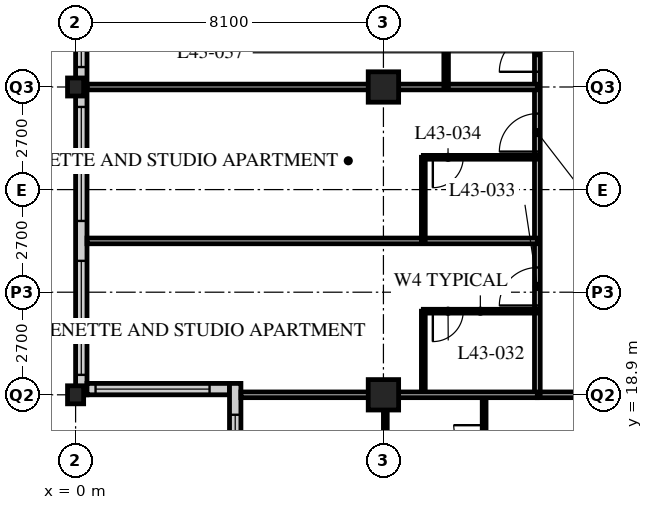
"""IFC4 building model, lengths in metres.
Left out: names, types, materials, properties, quantities, classifications, styles, units other than length and angle.
Written with IfcOpenShell. Run it as: python <this file> out.ifc"""

import sys

from ifc_helpers import new_model, si_unit, direction, frame, frame_2d, origin, origin_2d, place, context, subcontext, project, spatial, rectangle, hollow_rectangle, i_section, extrude, element, fill, save


model = new_model("IFC4")
c1 = context("Model", 3, precision=1e-05, world=origin(), true_north=direction((0.0, 1.0)))
c2 = subcontext(c1, "Body", "Model", "MODEL_VIEW")
j1 = project(units=[si_unit("LENGTHUNIT", "METRE"), si_unit("PLANEANGLEUNIT", "RADIAN")], contexts=[c1])
p1 = place(None, origin())
s1 = spatial("IfcSite", under=j1, at=p1, CompositionType="ELEMENT")
p2 = place(p1, origin())
s2 = spatial("IfcBuilding", under=s1, at=p2, CompositionType="ELEMENT")
p3 = place(p2, frame((0.0, 0.0, 170.4)))
s3 = spatial("IfcBuildingStorey", under=s2, at=p3, CompositionType="ELEMENT", Elevation=170.4)
for number, where, z_axis, x_axis in (
    (1, (0.0, 18.9, 0.0), (0.0, 0.0, 1.0), (1.0, 0.0, 0.0)),
    (2, (0.0, 27.0, 0.0), (0.0, 0.0, 1.0), (1.0, 0.0, 0.0)),
):
    element("IfcColumn", number, at=place(p3, frame(where, z_axis=z_axis, x_axis=x_axis)), inside=s3, PredefinedType="COLUMN", context=c2, shape_type="SweptSolid", body=[
        extrude(i_section(OverallWidth=0.424, OverallDepth=0.475, WebThickness=0.048, FlangeThickness=0.077, FilletRadius=0.015, at=origin_2d()), origin(), (0.0, 0.0, 1.0), 3.6),
    ])
for number, where, z_axis, x_axis in (
    (3, (8.1, 18.9, 0.0), (0.0, 0.0, 1.0), (1.0, 0.0, 0.0)),
    (4, (8.1, 27.0, 0.0), (0.0, 0.0, 1.0), (1.0, 0.0, 0.0)),
):
    element("IfcColumn", number, at=place(p3, frame(where, z_axis=z_axis, x_axis=x_axis)), inside=s3, PredefinedType="COLUMN", context=c2, shape_type="SweptSolid", body=[
        extrude(hollow_rectangle(XDim=0.8, YDim=0.8, WallThickness=0.08, at=origin_2d()), origin(), (0.0, 0.0, 1.0), 3.6),
    ])
p4 = place(p3, frame((0.15, 51.0, 0.0), z_axis=(0.0, 0.0, 1.0), x_axis=(0.0, -1.0, 0.0)))
e5 = element("IfcWall", 5, at=p4, inside=s3, PredefinedType="SOLIDWALL", context=c2, shape_type="SweptSolid", body=[
    extrude(rectangle(XDim=32.1, YDim=0.3, at=frame_2d((16.05, 0.0))), origin(), (0.0, 0.0, 1.0), 3.39),
])
p5 = place(p4, frame((0.225, 0.0, 0.6)))
e6 = element("IfcOpeningElement", 6, at=p5, cuts=e5, PredefinedType="OPENING", context=c2, shape_type="SweptSolid", body=[
    extrude(rectangle(XDim=3.0, YDim=2.4, at=frame_2d((1.5, 1.2))), frame((0.0, 0.16, 0.0), z_axis=(0.0, -1.0, 0.0), x_axis=(1.0, 0.0, 0.0)), (0.0, 0.0, 1.0), 0.32),
])
p6 = place(p4, frame((4.275, 0.0, 0.6)))
e7 = element("IfcOpeningElement", 7, at=p6, cuts=e5, PredefinedType="OPENING", context=c2, shape_type="SweptSolid", body=[
    extrude(rectangle(XDim=3.0, YDim=2.4, at=frame_2d((1.5, 1.2))), frame((0.0, 0.16, 0.0), z_axis=(0.0, -1.0, 0.0), x_axis=(1.0, 0.0, 0.0)), (0.0, 0.0, 1.0), 0.32),
])
p7 = place(p4, frame((8.325, 0.0, 0.6)))
e8 = element("IfcOpeningElement", 8, at=p7, cuts=e5, PredefinedType="OPENING", context=c2, shape_type="SweptSolid", body=[
    extrude(rectangle(XDim=3.0, YDim=2.4, at=frame_2d((1.5, 1.2))), frame((0.0, 0.16, 0.0), z_axis=(0.0, -1.0, 0.0), x_axis=(1.0, 0.0, 0.0)), (0.0, 0.0, 1.0), 0.32),
])
p8 = place(p4, frame((12.375, 0.0, 0.6)))
e9 = element("IfcOpeningElement", 9, at=p8, cuts=e5, PredefinedType="OPENING", context=c2, shape_type="SweptSolid", body=[
    extrude(rectangle(XDim=3.0, YDim=2.4, at=frame_2d((1.5, 1.2))), frame((0.0, 0.16, 0.0), z_axis=(0.0, -1.0, 0.0), x_axis=(1.0, 0.0, 0.0)), (0.0, 0.0, 1.0), 0.32),
])
p9 = place(p4, frame((16.425, 0.0, 0.6)))
e10 = element("IfcOpeningElement", 10, at=p9, cuts=e5, PredefinedType="OPENING", context=c2, shape_type="SweptSolid", body=[
    extrude(rectangle(XDim=3.0, YDim=2.4, at=frame_2d((1.5, 1.2))), frame((0.0, 0.16, 0.0), z_axis=(0.0, -1.0, 0.0), x_axis=(1.0, 0.0, 0.0)), (0.0, 0.0, 1.0), 0.32),
])
p10 = place(p4, frame((20.475, 0.0, 0.6)))
e11 = element("IfcOpeningElement", 11, at=p10, cuts=e5, PredefinedType="OPENING", context=c2, shape_type="SweptSolid", body=[
    extrude(rectangle(XDim=3.0, YDim=2.4, at=frame_2d((1.5, 1.2))), frame((0.0, 0.16, 0.0), z_axis=(0.0, -1.0, 0.0), x_axis=(1.0, 0.0, 0.0)), (0.0, 0.0, 1.0), 0.32),
])
p11 = place(p4, frame((24.525, 0.0, 0.6)))
e12 = element("IfcOpeningElement", 12, at=p11, cuts=e5, PredefinedType="OPENING", context=c2, shape_type="SweptSolid", body=[
    extrude(rectangle(XDim=3.0, YDim=2.4, at=frame_2d((1.5, 1.2))), frame((0.0, 0.16, 0.0), z_axis=(0.0, -1.0, 0.0), x_axis=(1.0, 0.0, 0.0)), (0.0, 0.0, 1.0), 0.32),
])
p12 = place(p4, frame((28.575, 0.0, 0.6)))
e13 = element("IfcOpeningElement", 13, at=p12, cuts=e5, PredefinedType="OPENING", context=c2, shape_type="SweptSolid", body=[
    extrude(rectangle(XDim=3.0, YDim=2.4, at=frame_2d((1.5, 1.2))), frame((0.0, 0.16, 0.0), z_axis=(0.0, -1.0, 0.0), x_axis=(1.0, 0.0, 0.0)), (0.0, 0.0, 1.0), 0.32),
])
p13 = place(p3, frame((0.3, 19.05, 0.0), z_axis=(0.0, 0.0, 1.0), x_axis=(1.0, 0.0, 0.0)))
e14 = element("IfcWall", 14, at=p13, inside=s3, PredefinedType="SOLIDWALL", context=c2, shape_type="SweptSolid", body=[
    extrude(rectangle(XDim=3.75, YDim=0.3, at=frame_2d((1.875, 0.0))), origin(), (0.0, 0.0, 1.0), 3.39),
])
p14 = place(p13, frame((0.225, 0.0, 0.6)))
e15 = element("IfcOpeningElement", 15, at=p14, cuts=e14, PredefinedType="OPENING", context=c2, shape_type="SweptSolid", body=[
    extrude(rectangle(XDim=3.0, YDim=2.0, at=frame_2d((1.5, 1.0))), frame((0.0, 0.16, 0.0), z_axis=(0.0, -1.0, 0.0), x_axis=(1.0, 0.0, 0.0)), (0.0, 0.0, 1.0), 0.32),
])
p15 = place(p3, frame((4.2, 19.2, 0.0), z_axis=(0.0, 0.0, 1.0), x_axis=(0.0, -1.0, 0.0)))
e16 = element("IfcWall", 16, at=p15, inside=s3, PredefinedType="SOLIDWALL", context=c2, shape_type="SweptSolid", body=[
    extrude(rectangle(XDim=4.35, YDim=0.3, at=frame_2d((2.175, 0.0))), origin(), (0.0, 0.0, 1.0), 3.39),
])
p16 = place(p15, frame((0.825, 0.0, 0.6)))
e17 = element("IfcOpeningElement", 17, at=p16, cuts=e16, PredefinedType="OPENING", context=c2, shape_type="SweptSolid", body=[
    extrude(rectangle(XDim=3.0, YDim=2.0, at=frame_2d((1.5, 1.0))), frame((0.0, 0.16, 0.0), z_axis=(0.0, -1.0, 0.0), x_axis=(1.0, 0.0, 0.0)), (0.0, 0.0, 1.0), 0.32),
])
p17 = place(p3, frame((12.15, 18.9, 0.0), z_axis=(0.0, 0.0, 1.0), x_axis=(1.0, 0.0, 0.0)))
e18 = element("IfcWall", 18, at=p17, inside=s3, PredefinedType="PARTITIONING", context=c2, shape_type="SweptSolid", body=[
    extrude(rectangle(XDim=32.4, YDim=0.15, at=frame_2d((16.2, 0.0))), origin(), (0.0, 0.0, 1.0), 2.778),
])
p18 = place(p17, frame((6.4, 0.0, 0.0)))
e19 = element("IfcOpeningElement", 19, at=p18, cuts=e18, PredefinedType="OPENING", context=c2, shape_type="SweptSolid", body=[
    extrude(rectangle(XDim=1.0, YDim=2.1, at=frame_2d((0.5, 1.05))), frame((0.0, 0.085, 0.0), z_axis=(0.0, -1.0, 0.0), x_axis=(1.0, 0.0, 0.0)), (0.0, 0.0, 1.0), 0.17),
])
p19 = place(p17, frame((8.8, 0.0, 0.0)))
e20 = element("IfcOpeningElement", 20, at=p19, cuts=e18, PredefinedType="OPENING", context=c2, shape_type="SweptSolid", body=[
    extrude(rectangle(XDim=1.0, YDim=2.1, at=frame_2d((0.5, 1.05))), frame((0.0, 0.085, 0.0), z_axis=(0.0, -1.0, 0.0), x_axis=(1.0, 0.0, 0.0)), (0.0, 0.0, 1.0), 0.17),
])
p20 = place(p17, frame((13.05, 0.0, 0.0)))
e21 = element("IfcOpeningElement", 21, at=p20, cuts=e18, PredefinedType="OPENING", context=c2, shape_type="SweptSolid", body=[
    extrude(rectangle(XDim=1.0, YDim=2.1, at=frame_2d((0.5, 1.05))), frame((0.0, 0.085, 0.0), z_axis=(0.0, -1.0, 0.0), x_axis=(1.0, 0.0, 0.0)), (0.0, 0.0, 1.0), 0.17),
])
p21 = place(p17, frame((22.6, 0.0, 0.0)))
e22 = element("IfcOpeningElement", 22, at=p21, cuts=e18, PredefinedType="OPENING", context=c2, shape_type="SweptSolid", body=[
    extrude(rectangle(XDim=1.0, YDim=2.1, at=frame_2d((0.5, 1.05))), frame((0.0, 0.085, 0.0), z_axis=(0.0, -1.0, 0.0), x_axis=(1.0, 0.0, 0.0)), (0.0, 0.0, 1.0), 0.17),
])
p22 = place(p17, frame((25.0, 0.0, 0.0)))
e23 = element("IfcOpeningElement", 23, at=p22, cuts=e18, PredefinedType="OPENING", context=c2, shape_type="SweptSolid", body=[
    extrude(rectangle(XDim=1.0, YDim=2.1, at=frame_2d((0.5, 1.05))), frame((0.0, 0.085, 0.0), z_axis=(0.0, -1.0, 0.0), x_axis=(1.0, 0.0, 0.0)), (0.0, 0.0, 1.0), 0.17),
])
p23 = place(p17, frame((1.525, 0.0, 0.0)))
e24 = element("IfcOpeningElement", 24, at=p23, cuts=e18, PredefinedType="OPENING", context=c2, shape_type="SweptSolid", body=[
    extrude(rectangle(XDim=1.0, YDim=2.1, at=frame_2d((0.5, 1.05))), frame((0.0, 0.085, 0.0), z_axis=(0.0, -1.0, 0.0), x_axis=(1.0, 0.0, 0.0)), (0.0, 0.0, 1.0), 0.17),
])
p24 = place(p17, frame((29.875, 0.0, 0.0)))
e25 = element("IfcOpeningElement", 25, at=p24, cuts=e18, PredefinedType="OPENING", context=c2, shape_type="SweptSolid", body=[
    extrude(rectangle(XDim=1.0, YDim=2.1, at=frame_2d((0.5, 1.05))), frame((0.0, 0.085, 0.0), z_axis=(0.0, -1.0, 0.0), x_axis=(1.0, 0.0, 0.0)), (0.0, 0.0, 1.0), 0.17),
])
p25 = place(p3, frame((12.15, 18.9, 0.0), z_axis=(0.0, 0.0, 1.0), x_axis=(0.0, 1.0, 0.0)))
e26 = element("IfcWall", 26, at=p25, inside=s3, PredefinedType="PARTITIONING", context=c2, shape_type="SweptSolid", body=[
    extrude(rectangle(XDim=24.3, YDim=0.15, at=frame_2d((12.15, 0.0))), origin(), (0.0, 0.0, 1.0), 3.39),
])
p26 = place(p25, frame((2.35, 0.0, 0.0)))
e27 = element("IfcOpeningElement", 27, at=p26, cuts=e26, PredefinedType="OPENING", context=c2, shape_type="SweptSolid", body=[
    extrude(rectangle(XDim=1.0, YDim=2.1, at=frame_2d((0.5, 1.05))), frame((0.0, 0.085, 0.0), z_axis=(0.0, -1.0, 0.0), x_axis=(1.0, 0.0, 0.0)), (0.0, 0.0, 1.0), 0.17),
])
p27 = place(p25, frame((6.4, 0.0, 0.0)))
e28 = element("IfcOpeningElement", 28, at=p27, cuts=e26, PredefinedType="OPENING", context=c2, shape_type="SweptSolid", body=[
    extrude(rectangle(XDim=1.0, YDim=2.1, at=frame_2d((0.5, 1.05))), frame((0.0, 0.085, 0.0), z_axis=(0.0, -1.0, 0.0), x_axis=(1.0, 0.0, 0.0)), (0.0, 0.0, 1.0), 0.17),
])
p28 = place(p25, frame((8.5, 0.0, 0.0)))
e29 = element("IfcOpeningElement", 29, at=p28, cuts=e26, PredefinedType="OPENING", context=c2, shape_type="SweptSolid", body=[
    extrude(rectangle(XDim=1.0, YDim=2.1, at=frame_2d((0.5, 1.05))), frame((0.0, 0.085, 0.0), z_axis=(0.0, -1.0, 0.0), x_axis=(1.0, 0.0, 0.0)), (0.0, 0.0, 1.0), 0.17),
])
p29 = place(p25, frame((16.6, 0.0, 0.0)))
e30 = element("IfcOpeningElement", 30, at=p29, cuts=e26, PredefinedType="OPENING", context=c2, shape_type="SweptSolid", body=[
    extrude(rectangle(XDim=1.0, YDim=2.1, at=frame_2d((0.5, 1.05))), frame((0.0, 0.085, 0.0), z_axis=(0.0, -1.0, 0.0), x_axis=(1.0, 0.0, 0.0)), (0.0, 0.0, 1.0), 0.17),
])
p30 = place(p3, frame((9.15, 18.9, 0.0), z_axis=(0.0, 0.0, 1.0), x_axis=(0.0, 1.0, 0.0)))
e31 = element("IfcWall", 31, at=p30, inside=s3, PredefinedType="PARTITIONING", context=c2, shape_type="SweptSolid", body=[
    extrude(rectangle(XDim=2.2, YDim=0.1, at=frame_2d((1.1, 0.0))), origin(), (0.0, 0.0, 1.0), 3.39),
])
p31 = place(p3, frame((12.15, 21.1, 0.0), z_axis=(0.0, 0.0, 1.0), x_axis=(-1.0, 0.0, 0.0)))
e32 = element("IfcWall", 32, at=p31, inside=s3, PredefinedType="PARTITIONING", context=c2, shape_type="SweptSolid", body=[
    extrude(rectangle(XDim=3.0, YDim=0.1, at=frame_2d((1.5, 0.0))), origin(), (0.0, 0.0, 1.0), 3.39),
])
p32 = place(p31, frame((1.95, 0.0, 0.0)))
e33 = element("IfcOpeningElement", 33, at=p32, cuts=e32, PredefinedType="OPENING", context=c2, shape_type="SweptSolid", body=[
    extrude(rectangle(XDim=0.8, YDim=2.1, at=frame_2d((0.4, 1.05))), frame((0.0, 0.06, 0.0), z_axis=(0.0, -1.0, 0.0), x_axis=(1.0, 0.0, 0.0)), (0.0, 0.0, 1.0), 0.12),
])
p33 = place(p3, frame((12.15, 22.95, 0.0), z_axis=(0.0, 0.0, 1.0), x_axis=(-1.0, 0.0, 0.0)))
e34 = element("IfcWall", 34, at=p33, inside=s3, PredefinedType="PARTITIONING", context=c2, shape_type="SweptSolid", body=[
    extrude(rectangle(XDim=11.85, YDim=0.15, at=frame_2d((5.925, 0.0))), origin(), (0.0, 0.0, 1.0), 3.39),
])
p34 = place(p3, frame((9.15, 22.95, 0.0), z_axis=(0.0, 0.0, 1.0), x_axis=(0.0, 1.0, 0.0)))
e35 = element("IfcWall", 35, at=p34, inside=s3, PredefinedType="PARTITIONING", context=c2, shape_type="SweptSolid", body=[
    extrude(rectangle(XDim=2.2, YDim=0.1, at=frame_2d((1.1, 0.0))), origin(), (0.0, 0.0, 1.0), 3.39),
])
p35 = place(p3, frame((12.15, 25.15, 0.0), z_axis=(0.0, 0.0, 1.0), x_axis=(-1.0, 0.0, 0.0)))
e36 = element("IfcWall", 36, at=p35, inside=s3, PredefinedType="PARTITIONING", context=c2, shape_type="SweptSolid", body=[
    extrude(rectangle(XDim=3.0, YDim=0.1, at=frame_2d((1.5, 0.0))), origin(), (0.0, 0.0, 1.0), 3.39),
])
p36 = place(p35, frame((1.95, 0.0, 0.0)))
e37 = element("IfcOpeningElement", 37, at=p36, cuts=e36, PredefinedType="OPENING", context=c2, shape_type="SweptSolid", body=[
    extrude(rectangle(XDim=0.8, YDim=2.1, at=frame_2d((0.4, 1.05))), frame((0.0, 0.06, 0.0), z_axis=(0.0, -1.0, 0.0), x_axis=(1.0, 0.0, 0.0)), (0.0, 0.0, 1.0), 0.12),
])
p37 = place(p3, frame((12.15, 27.0, 0.0), z_axis=(0.0, 0.0, 1.0), x_axis=(-1.0, 0.0, 0.0)))
e38 = element("IfcWall", 38, at=p37, inside=s3, PredefinedType="PARTITIONING", context=c2, shape_type="SweptSolid", body=[
    extrude(rectangle(XDim=11.85, YDim=0.15, at=frame_2d((5.925, 0.0))), origin(), (0.0, 0.0, 1.0), 2.778),
])
p38 = place(p3, frame((9.75, 27.0, 0.0), z_axis=(0.0, 0.0, 1.0), x_axis=(0.0, 1.0, 0.0)))
e39 = element("IfcWall", 39, at=p38, inside=s3, PredefinedType="PARTITIONING", context=c2, shape_type="SweptSolid", body=[
    extrude(rectangle(XDim=16.2, YDim=0.12, at=frame_2d((8.1, 0.0))), origin(), (0.0, 0.0, 1.0), 3.39),
])
p39 = place(p38, frame((0.975, 0.0, 0.0)))
e40 = element("IfcOpeningElement", 40, at=p39, cuts=e39, PredefinedType="OPENING", context=c2, shape_type="SweptSolid", body=[
    extrude(rectangle(XDim=0.85, YDim=2.1, at=frame_2d((0.425, 1.05))), frame((0.0, 0.07, 0.0), z_axis=(0.0, -1.0, 0.0), x_axis=(1.0, 0.0, 0.0)), (0.0, 0.0, 1.0), 0.14),
])
p40 = place(p38, frame((4.375, 0.0, 0.0)))
e41 = element("IfcOpeningElement", 41, at=p40, cuts=e39, PredefinedType="OPENING", context=c2, shape_type="SweptSolid", body=[
    extrude(rectangle(XDim=0.85, YDim=2.1, at=frame_2d((0.425, 1.05))), frame((0.0, 0.07, 0.0), z_axis=(0.0, -1.0, 0.0), x_axis=(1.0, 0.0, 0.0)), (0.0, 0.0, 1.0), 0.14),
])
p41 = place(p38, frame((9.075, 0.0, 0.0)))
e42 = element("IfcOpeningElement", 42, at=p41, cuts=e39, PredefinedType="OPENING", context=c2, shape_type="SweptSolid", body=[
    extrude(rectangle(XDim=0.85, YDim=2.1, at=frame_2d((0.425, 1.05))), frame((0.0, 0.07, 0.0), z_axis=(0.0, -1.0, 0.0), x_axis=(1.0, 0.0, 0.0)), (0.0, 0.0, 1.0), 0.14),
])
p42 = place(p38, frame((12.475, 0.0, 0.0)))
e43 = element("IfcOpeningElement", 43, at=p42, cuts=e39, PredefinedType="OPENING", context=c2, shape_type="SweptSolid", body=[
    extrude(rectangle(XDim=0.85, YDim=2.1, at=frame_2d((0.425, 1.05))), frame((0.0, 0.07, 0.0), z_axis=(0.0, -1.0, 0.0), x_axis=(1.0, 0.0, 0.0)), (0.0, 0.0, 1.0), 0.14),
])
p43 = place(p3, frame((10.75, 18.9, 0.0), z_axis=(0.0, 0.0, 1.0), x_axis=(0.0, -1.0, 0.0)))
e44 = element("IfcWall", 44, at=p43, inside=s3, PredefinedType="PARTITIONING", context=c2, shape_type="SweptSolid", body=[
    extrude(rectangle(XDim=2.4, YDim=0.1, at=frame_2d((1.2, 0.0))), origin(), (0.0, 0.0, 1.0), 3.39),
])
p44 = place(p43, frame((0.8, 0.0, 0.0)))
e45 = element("IfcOpeningElement", 45, at=p44, cuts=e44, PredefinedType="OPENING", context=c2, shape_type="SweptSolid", body=[
    extrude(rectangle(XDim=0.8, YDim=2.1, at=frame_2d((0.4, 1.05))), frame((0.0, 0.06, 0.0), z_axis=(0.0, -1.0, 0.0), x_axis=(1.0, 0.0, 0.0)), (0.0, 0.0, 1.0), 0.12),
])
p45 = place(p3, frame((8.15, 18.9, 0.0), z_axis=(0.0, 0.0, 1.0), x_axis=(0.0, -1.0, 0.0)))
e46 = element("IfcWall", 46, at=p45, inside=s3, PredefinedType="PARTITIONING", context=c2, shape_type="SweptSolid", body=[
    extrude(rectangle(XDim=2.4, YDim=0.1, at=frame_2d((1.2, 0.0))), origin(), (0.0, 0.0, 1.0), 2.778),
])
p46 = place(p3, frame((4.35, 18.9, 0.0), z_axis=(0.0, 0.0, 1.0), x_axis=(1.0, 0.0, 0.0)))
e47 = element("IfcWall", 47, at=p46, inside=s3, PredefinedType="PARTITIONING", context=c2, shape_type="SweptSolid", body=[
    extrude(rectangle(XDim=7.8, YDim=0.15, at=frame_2d((3.9, 0.0))), origin(), (0.0, 0.0, 1.0), 2.778),
])
p47 = place(p10, origin())
e48 = element("IfcWindow", 48, at=p47, inside=s3, PartitioningType="SINGLE_PANEL", PredefinedType="WINDOW", context=c2, shape_type="SweptSolid", body=[
    extrude(rectangle(XDim=3.0, YDim=2.4, at=frame_2d((1.5, 1.2))), frame((0.0, 0.03, 0.0), z_axis=(0.0, -1.0, 0.0), x_axis=(1.0, 0.0, 0.0)), (0.0, 0.0, 1.0), 0.06),
])
fill(e11, e48)
p48 = place(p11, origin())
e49 = element("IfcWindow", 49, at=p48, inside=s3, PartitioningType="SINGLE_PANEL", PredefinedType="WINDOW", context=c2, shape_type="SweptSolid", body=[
    extrude(rectangle(XDim=3.0, YDim=2.4, at=frame_2d((1.5, 1.2))), frame((0.0, 0.03, 0.0), z_axis=(0.0, -1.0, 0.0), x_axis=(1.0, 0.0, 0.0)), (0.0, 0.0, 1.0), 0.06),
])
fill(e12, e49)
p49 = place(p12, origin())
e50 = element("IfcWindow", 50, at=p49, inside=s3, PartitioningType="SINGLE_PANEL", PredefinedType="WINDOW", context=c2, shape_type="SweptSolid", body=[
    extrude(rectangle(XDim=3.0, YDim=2.4, at=frame_2d((1.5, 1.2))), frame((0.0, 0.03, 0.0), z_axis=(0.0, -1.0, 0.0), x_axis=(1.0, 0.0, 0.0)), (0.0, 0.0, 1.0), 0.06),
])
fill(e13, e50)
p50 = place(p14, origin())
e51 = element("IfcWindow", 51, at=p50, inside=s3, PartitioningType="SINGLE_PANEL", PredefinedType="WINDOW", context=c2, shape_type="SweptSolid", body=[
    extrude(rectangle(XDim=3.0, YDim=2.0, at=frame_2d((1.5, 1.0))), frame((0.0, 0.03, 0.0), z_axis=(0.0, -1.0, 0.0), x_axis=(1.0, 0.0, 0.0)), (0.0, 0.0, 1.0), 0.06),
])
fill(e15, e51)
p51 = place(p16, origin())
e52 = element("IfcWindow", 52, at=p51, inside=s3, PartitioningType="SINGLE_PANEL", PredefinedType="WINDOW", context=c2, shape_type="SweptSolid", body=[
    extrude(rectangle(XDim=3.0, YDim=2.0, at=frame_2d((1.5, 1.0))), frame((0.0, 0.03, 0.0), z_axis=(0.0, -1.0, 0.0), x_axis=(1.0, 0.0, 0.0)), (0.0, 0.0, 1.0), 0.06),
])
fill(e17, e52)
p52 = place(p32, origin())
e53 = element("IfcDoor", 53, at=p52, inside=s3, OperationType="SINGLE_SWING_RIGHT", PredefinedType="DOOR", context=c2, shape_type="SweptSolid", body=[
    extrude(rectangle(XDim=0.8, YDim=2.1, at=frame_2d((0.4, 1.05))), frame((0.0, 0.025, 0.0), z_axis=(0.0, -1.0, 0.0), x_axis=(1.0, 0.0, 0.0)), (0.0, 0.0, 1.0), 0.05),
])
fill(e33, e53)
p53 = place(p26, origin())
e54 = element("IfcDoor", 54, at=p53, inside=s3, OperationType="SINGLE_SWING_LEFT", PredefinedType="DOOR", context=c2, shape_type="SweptSolid", body=[
    extrude(rectangle(XDim=1.0, YDim=2.1, at=frame_2d((0.5, 1.05))), frame((0.0, 0.025, 0.0), z_axis=(0.0, -1.0, 0.0), x_axis=(1.0, 0.0, 0.0)), (0.0, 0.0, 1.0), 0.05),
])
fill(e27, e54)
p54 = place(p36, origin())
e55 = element("IfcDoor", 55, at=p54, inside=s3, OperationType="SINGLE_SWING_RIGHT", PredefinedType="DOOR", context=c2, shape_type="SweptSolid", body=[
    extrude(rectangle(XDim=0.8, YDim=2.1, at=frame_2d((0.4, 1.05))), frame((0.0, 0.025, 0.0), z_axis=(0.0, -1.0, 0.0), x_axis=(1.0, 0.0, 0.0)), (0.0, 0.0, 1.0), 0.05),
])
fill(e37, e55)
p55 = place(p27, origin())
e56 = element("IfcDoor", 56, at=p55, inside=s3, OperationType="SINGLE_SWING_LEFT", PredefinedType="DOOR", context=c2, shape_type="SweptSolid", body=[
    extrude(rectangle(XDim=1.0, YDim=2.1, at=frame_2d((0.5, 1.05))), frame((0.0, 0.025, 0.0), z_axis=(0.0, -1.0, 0.0), x_axis=(1.0, 0.0, 0.0)), (0.0, 0.0, 1.0), 0.05),
])
fill(e28, e56)
p56 = place(p28, origin())
e57 = element("IfcDoor", 57, at=p56, inside=s3, OperationType="SINGLE_SWING_LEFT", PredefinedType="DOOR", context=c2, shape_type="SweptSolid", body=[
    extrude(rectangle(XDim=1.0, YDim=2.1, at=frame_2d((0.5, 1.05))), frame((0.0, 0.025, 0.0), z_axis=(0.0, -1.0, 0.0), x_axis=(1.0, 0.0, 0.0)), (0.0, 0.0, 1.0), 0.05),
])
fill(e29, e57)
p57 = place(p44, origin())
e58 = element("IfcDoor", 58, at=p57, inside=s3, OperationType="SINGLE_SWING_RIGHT", PredefinedType="DOOR", context=c2, shape_type="SweptSolid", body=[
    extrude(rectangle(XDim=0.8, YDim=2.1, at=frame_2d((0.4, 1.05))), frame((0.0, 0.025, 0.0), z_axis=(0.0, -1.0, 0.0), x_axis=(1.0, 0.0, 0.0)), (0.0, 0.0, 1.0), 0.05),
])
fill(e45, e58)
save(model, sys.argv[1])
